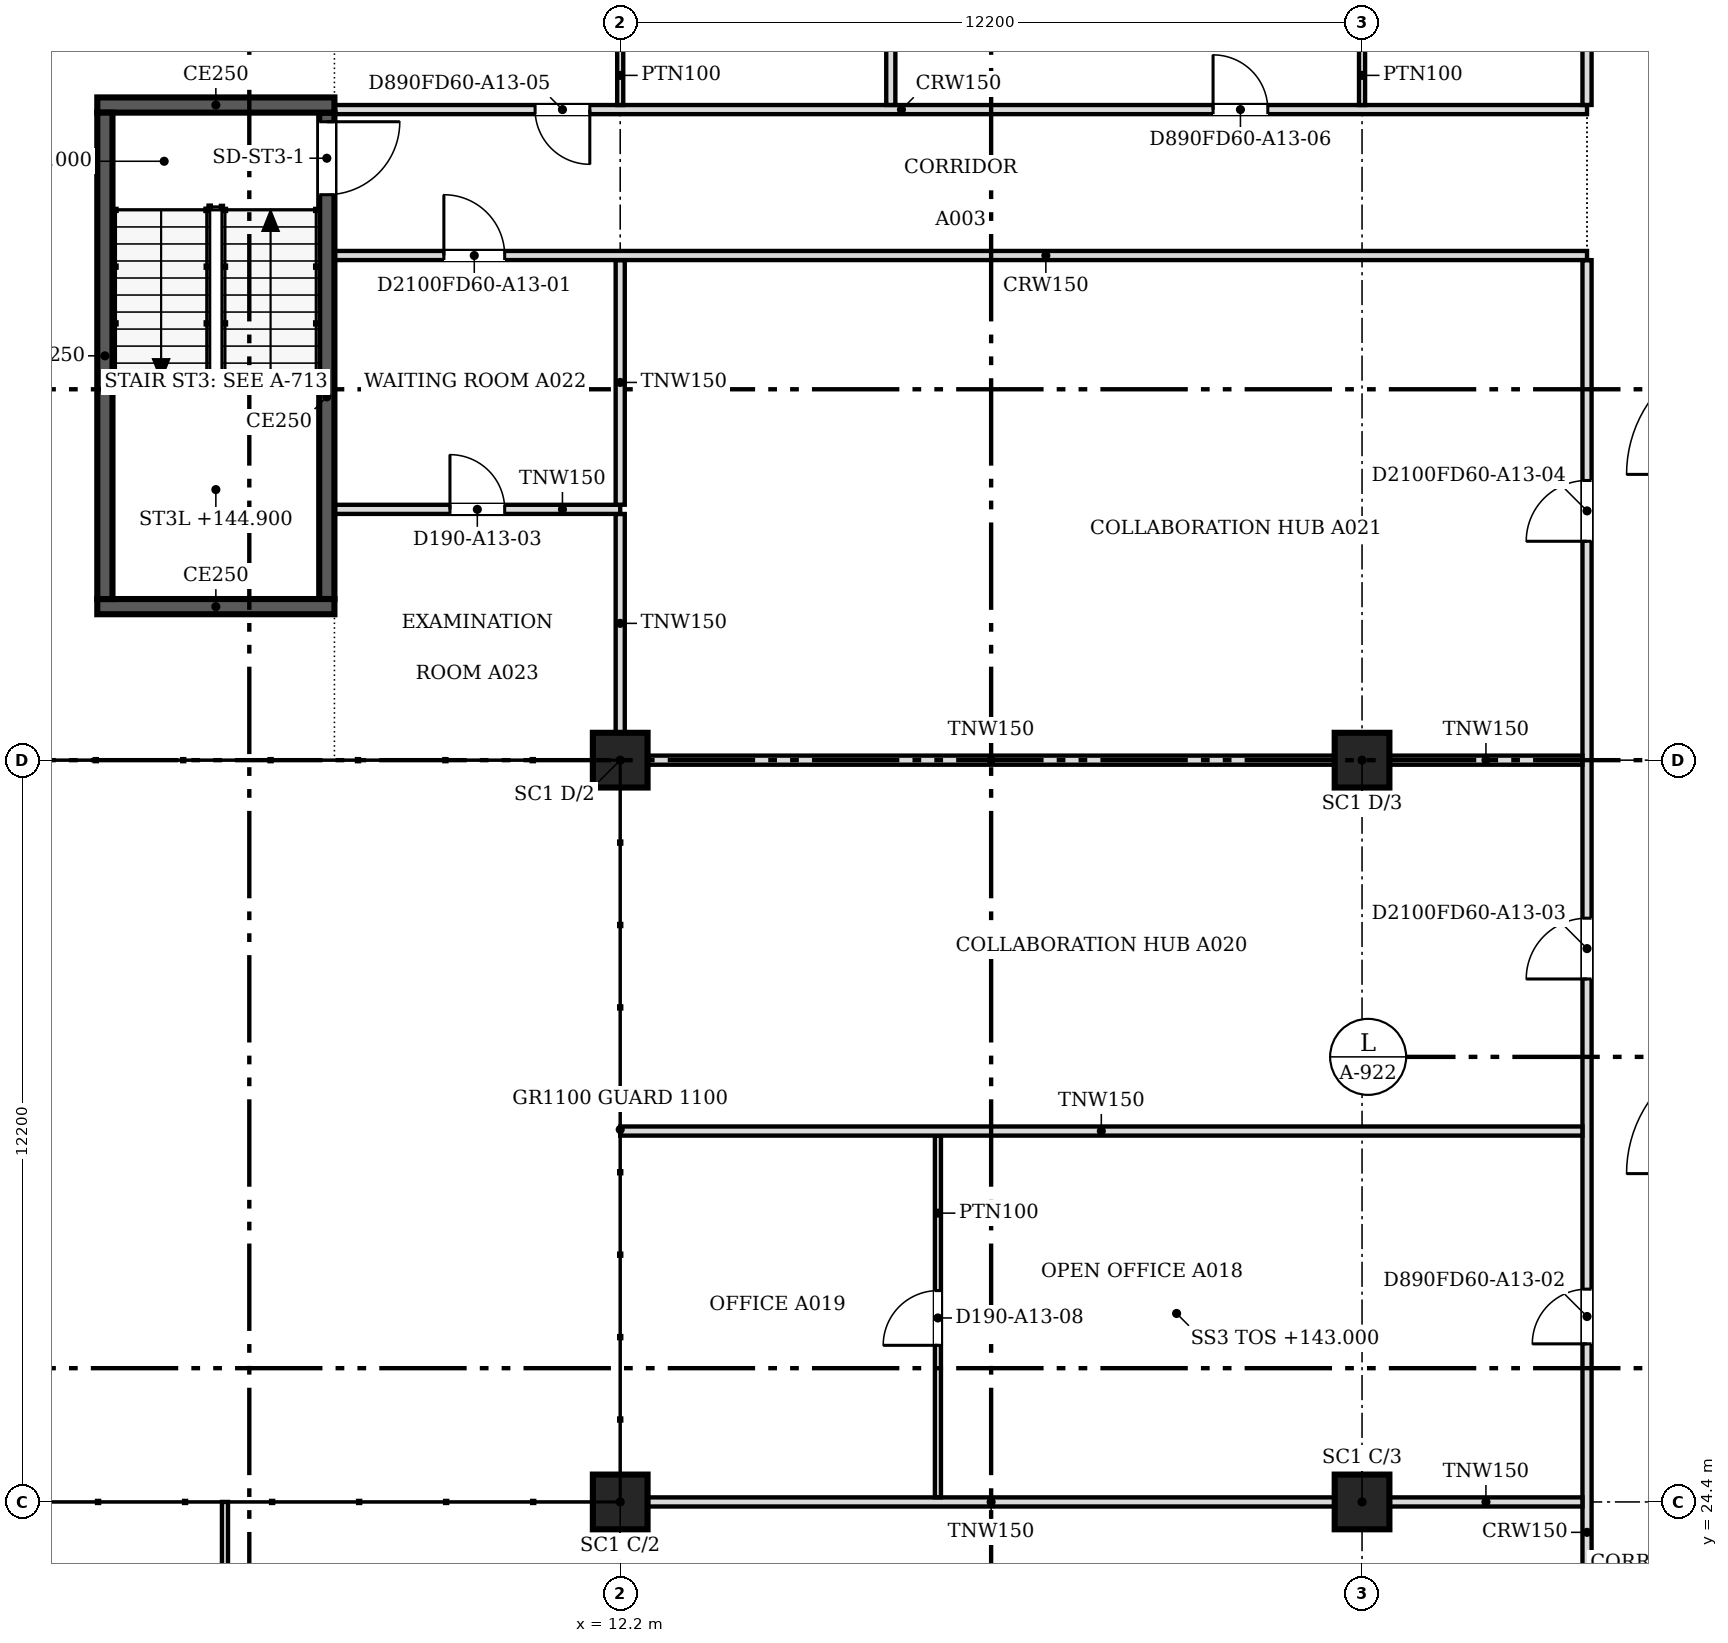
"""IFC4 building model, lengths in metres.
Left out: names, types, materials, properties, quantities, classifications, styles, units other than length and angle.
Written with IfcOpenShell. Run it as: python <this file> out.ifc"""

import sys

from ifc_helpers import new_model, si_unit, direction, frame, frame_2d, origin, origin_2d, place, context, subcontext, project, spatial, rectangle, extrude, source, transform, mapped, element, fill, save


model = new_model("IFC4")
c1 = context("Model", 3, precision=1e-05, world=origin(), true_north=direction((0.0, 1.0)))
c2 = subcontext(c1, "Body", "Model", "MODEL_VIEW")
j1 = project(units=[si_unit("LENGTHUNIT", "METRE"), si_unit("PLANEANGLEUNIT", "RADIAN")], contexts=[c1])
p1 = place(None, origin())
s1 = spatial("IfcSite", under=j1, at=p1, CompositionType="ELEMENT")
p2 = place(p1, origin())
s2 = spatial("IfcBuilding", under=s1, at=p2, CompositionType="ELEMENT")
p3 = place(p2, frame((0.0, 0.0, 143.0)))
s3 = spatial("IfcBuildingStorey", under=s2, at=p3, CompositionType="ELEMENT", Elevation=143.0)
for number, where, z_axis, x_axis in (
    (1, (12.2, 24.4, 0.0), (0.0, 0.0, 1.0), (1.0, 0.0, 0.0)),
    (2, (12.2, 36.6, 0.0), (0.0, 0.0, 1.0), (1.0, 0.0, 0.0)),
    (3, (24.4, 24.4, 0.0), (0.0, 0.0, 1.0), (1.0, 0.0, 0.0)),
    (4, (24.4, 36.6, 0.0), (0.0, 0.0, 1.0), (1.0, 0.0, 0.0)),
):
    element("IfcColumn", number, at=place(p3, frame(where, z_axis=z_axis, x_axis=x_axis)), inside=s3, PredefinedType="COLUMN", context=c2, shape_type="SweptSolid", body=[
        extrude(rectangle(XDim=0.9, YDim=0.9, at=origin_2d()), origin(), (0.0, 0.0, 1.0), 3.6),
    ])
p4 = place(p3, frame((7.5, 39.125, 0.0), z_axis=(0.0, 0.0, 1.0), x_axis=(-1.0, 0.0, 0.0)))
e5 = element("IfcWall", 5, at=p4, inside=s3, PredefinedType="SOLIDWALL", context=c2, shape_type="SweptSolid", body=[
    extrude(rectangle(XDim=3.9, YDim=0.25, at=frame_2d((1.95, 0.0))), origin(), (0.0, 0.0, 1.0), 3.8),
])
p5 = place(p3, frame((3.725, 39.25, 0.0), z_axis=(0.0, 0.0, 1.0), x_axis=(0.0, 1.0, 0.0)))
e6 = element("IfcWall", 6, at=p5, inside=s3, PredefinedType="SOLIDWALL", context=c2, shape_type="SweptSolid", body=[
    extrude(rectangle(XDim=8.0, YDim=0.25, at=frame_2d((4.0, 0.0))), origin(), (0.0, 0.0, 1.0), 3.8),
])
p6 = place(p3, frame((3.6, 47.375, 0.0), z_axis=(0.0, 0.0, 1.0), x_axis=(1.0, 0.0, 0.0)))
e7 = element("IfcWall", 7, at=p6, inside=s3, PredefinedType="SOLIDWALL", context=c2, shape_type="SweptSolid", body=[
    extrude(rectangle(XDim=3.9, YDim=0.25, at=frame_2d((1.95, 0.0))), origin(), (0.0, 0.0, 1.0), 3.8),
])
p7 = place(p3, frame((7.375, 47.25, 0.0), z_axis=(0.0, 0.0, 1.0), x_axis=(0.0, -1.0, 0.0)))
e8 = element("IfcWall", 8, at=p7, inside=s3, PredefinedType="SOLIDWALL", context=c2, shape_type="SweptSolid", body=[
    extrude(rectangle(XDim=8.0, YDim=0.25, at=frame_2d((4.0, 0.0))), origin(), (0.0, 0.0, 1.0), 3.8),
])
m1 = source(origin(), c2, "Body", "SweptSolid", [
    extrude(rectangle(XDim=1.2, YDim=2.1, at=frame_2d((0.6, 1.05))), frame((0.0, 0.135, 0.0), z_axis=(0.0, -1.0, 0.0), x_axis=(1.0, 0.0, 0.0)), (0.0, 0.0, 1.0), 0.27),
])
p8 = place(p7, frame((0.15, 0.0, 0.0)))
e9 = element("IfcOpeningElement", 9, at=p8, cuts=e8, PredefinedType="OPENING", context=c2, shape_type="MappedRepresentation", body=[
    mapped(m1, transform((0.0, 0.0, 0.0), scale=1.0)),
])
p9 = place(p3, frame((28.1, 18.8, 0.0), z_axis=(0.0, 0.0, 1.0), x_axis=(0.0, 1.0, 0.0)))
e10 = element("IfcWall", 10, at=p9, inside=s3, PredefinedType="PARTITIONING", context=c2, shape_type="SweptSolid", body=[
    extrude(rectangle(XDim=26.024, YDim=0.15, at=frame_2d((13.012, 0.0))), origin(), (0.0, 0.0, 1.0), 3.067),
])
m2 = source(origin(), c2, "Body", "SweptSolid", [
    extrude(rectangle(XDim=0.9, YDim=2.1, at=frame_2d((0.45, 1.05))), frame((0.0, 0.085, 0.0), z_axis=(0.0, -1.0, 0.0), x_axis=(1.0, 0.0, 0.0)), (0.0, 0.0, 1.0), 0.17),
])
p10 = place(p9, frame((1.1, 0.0, 0.0)))
e11 = element("IfcOpeningElement", 11, at=p10, cuts=e10, PredefinedType="OPENING", context=c2, shape_type="MappedRepresentation", body=[
    mapped(m2, transform((0.0, 0.0, 0.0), scale=1.0)),
])
m3 = source(origin(), c2, "Body", "SweptSolid", [
    extrude(rectangle(XDim=1.0, YDim=2.1, at=frame_2d((0.5, 1.05))), frame((0.0, 0.085, 0.0), z_axis=(0.0, -1.0, 0.0), x_axis=(1.0, 0.0, 0.0)), (0.0, 0.0, 1.0), 0.17),
])
p11 = place(p9, frame((14.201, 0.0, 0.0)))
e12 = element("IfcOpeningElement", 12, at=p11, cuts=e10, PredefinedType="OPENING", context=c2, shape_type="MappedRepresentation", body=[
    mapped(m3, transform((0.0, 0.0, 0.0), scale=1.0)),
])
p12 = place(p9, frame((8.2, 0.0, 0.0)))
e13 = element("IfcOpeningElement", 13, at=p12, cuts=e10, PredefinedType="OPENING", context=c2, shape_type="MappedRepresentation", body=[
    mapped(m2, transform((0.0, 0.0, 0.0), scale=1.0)),
])
p13 = place(p9, frame((21.4, 0.0, 0.0)))
e14 = element("IfcOpeningElement", 14, at=p13, cuts=e10, PredefinedType="OPENING", context=c2, shape_type="MappedRepresentation", body=[
    mapped(m3, transform((0.0, 0.0, 0.0), scale=1.0)),
])
p14 = place(p3, frame((5.7, 18.99, 0.0), z_axis=(0.0, 0.0, 1.0), x_axis=(0.0, 1.0, 0.0)))
e15 = element("IfcWall", 15, at=p14, inside=s3, PredefinedType="PARTITIONING", context=c2, shape_type="SweptSolid", body=[
    extrude(rectangle(XDim=5.41, YDim=0.1, at=frame_2d((2.705, 0.0))), origin(), (0.0, 0.0, 1.0), 3.067),
])
m4 = source(origin(), c2, "Body", "SweptSolid", [
    extrude(rectangle(XDim=0.9, YDim=2.1, at=frame_2d((0.45, 1.05))), frame((0.0, 0.06, 0.0), z_axis=(0.0, -1.0, 0.0), x_axis=(1.0, 0.0, 0.0)), (0.0, 0.0, 1.0), 0.12),
])
p15 = place(p14, frame((2.3, 0.0, 0.0)))
e16 = element("IfcOpeningElement", 16, at=p15, cuts=e15, PredefinedType="OPENING", context=c2, shape_type="MappedRepresentation", body=[
    mapped(m4, transform((0.0, 0.0, 0.0), scale=1.0)),
])
p16 = place(p3, frame((12.651, 24.4, 0.0), z_axis=(0.0, 0.0, 1.0), x_axis=(1.0, 0.0, 0.0)))
e17 = element("IfcWall", 17, at=p16, inside=s3, PredefinedType="PARTITIONING", context=c2, shape_type="SweptSolid", body=[
    extrude(rectangle(XDim=11.298, YDim=0.15, at=frame_2d((5.649, 0.0))), origin(), (0.0, 0.0, 1.0), 3.067),
])
p17 = place(p3, frame((24.851, 24.4, 0.0), z_axis=(0.0, 0.0, 1.0), x_axis=(1.0, 0.0, 0.0)))
e18 = element("IfcWall", 18, at=p17, inside=s3, PredefinedType="PARTITIONING", context=c2, shape_type="SweptSolid", body=[
    extrude(rectangle(XDim=3.173, YDim=0.15, at=frame_2d((1.586, 0.0))), origin(), (0.0, 0.0, 1.0), 3.067),
])
p18 = place(p3, frame((17.425, 24.476, 0.0), z_axis=(0.0, 0.0, 1.0), x_axis=(0.0, 1.0, 0.0)))
e19 = element("IfcWall", 19, at=p18, inside=s3, PredefinedType="PARTITIONING", context=c2, shape_type="SweptSolid", body=[
    extrude(rectangle(XDim=5.948, YDim=0.1, at=frame_2d((2.974, 0.0))), origin(), (0.0, 0.0, 1.0), 3.067),
])
p19 = place(p18, frame((2.5, 0.0, 0.0)))
e20 = element("IfcOpeningElement", 20, at=p19, cuts=e19, PredefinedType="OPENING", context=c2, shape_type="MappedRepresentation", body=[
    mapped(m4, transform((0.0, 0.0, 0.0), scale=1.0)),
])
p20 = place(p3, frame((12.2, 30.5, 0.0), z_axis=(0.0, 0.0, 1.0), x_axis=(1.0, 0.0, 0.0)))
e21 = element("IfcWall", 21, at=p20, inside=s3, PredefinedType="PARTITIONING", context=c2, shape_type="SweptSolid", body=[
    extrude(rectangle(XDim=15.824, YDim=0.15, at=frame_2d((7.912, 0.0))), origin(), (0.0, 0.0, 1.0), 3.067),
])
p21 = place(p3, frame((12.651, 36.6, 0.0), z_axis=(0.0, 0.0, 1.0), x_axis=(1.0, 0.0, 0.0)))
e22 = element("IfcWall", 22, at=p21, inside=s3, PredefinedType="PARTITIONING", context=c2, shape_type="SweptSolid", body=[
    extrude(rectangle(XDim=11.298, YDim=0.15, at=frame_2d((5.649, 0.0))), origin(), (0.0, 0.0, 1.0), 3.067),
])
p22 = place(p3, frame((24.851, 36.6, 0.0), z_axis=(0.0, 0.0, 1.0), x_axis=(1.0, 0.0, 0.0)))
e23 = element("IfcWall", 23, at=p22, inside=s3, PredefinedType="PARTITIONING", context=c2, shape_type="SweptSolid", body=[
    extrude(rectangle(XDim=3.173, YDim=0.15, at=frame_2d((1.586, 0.0))), origin(), (0.0, 0.0, 1.0), 3.067),
])
p23 = place(p3, frame((12.2, 37.051, 0.0), z_axis=(0.0, 0.0, 1.0), x_axis=(0.0, 1.0, 0.0)))
e24 = element("IfcWall", 24, at=p23, inside=s3, PredefinedType="PARTITIONING", context=c2, shape_type="SweptSolid", body=[
    extrude(rectangle(XDim=3.598, YDim=0.15, at=frame_2d((1.799, 0.0))), origin(), (0.0, 0.0, 1.0), 3.067),
])
p24 = place(p3, frame((12.2, 40.725, 0.0), z_axis=(0.0, 0.0, 1.0), x_axis=(-1.0, 0.0, 0.0)))
e25 = element("IfcWall", 25, at=p24, inside=s3, PredefinedType="PARTITIONING", context=c2, shape_type="SweptSolid", body=[
    extrude(rectangle(XDim=4.7, YDim=0.15, at=frame_2d((2.35, 0.0))), origin(), (0.0, 0.0, 1.0), 3.067),
])
p25 = place(p24, frame((1.9, 0.0, 0.0)))
e26 = element("IfcOpeningElement", 26, at=p25, cuts=e25, PredefinedType="OPENING", context=c2, shape_type="MappedRepresentation", body=[
    mapped(m2, transform((0.0, 0.0, 0.0), scale=1.0)),
])
p26 = place(p3, frame((12.2, 40.801, 0.0), z_axis=(0.0, 0.0, 1.0), x_axis=(0.0, 1.0, 0.0)))
e27 = element("IfcWall", 27, at=p26, inside=s3, PredefinedType="PARTITIONING", context=c2, shape_type="SweptSolid", body=[
    extrude(rectangle(XDim=4.023, YDim=0.15, at=frame_2d((2.011, 0.0))), origin(), (0.0, 0.0, 1.0), 3.067),
])
p27 = place(p3, frame((28.1, 44.9, 0.0), z_axis=(0.0, 0.0, 1.0), x_axis=(-1.0, 0.0, 0.0)))
e28 = element("IfcWall", 28, at=p27, inside=s3, PredefinedType="PARTITIONING", context=c2, shape_type="SweptSolid", body=[
    extrude(rectangle(XDim=20.6, YDim=0.15, at=frame_2d((10.3, 0.0))), origin(), (0.0, 0.0, 1.0), 3.067),
])
p28 = place(p27, frame((17.8, 0.0, 0.0)))
e29 = element("IfcOpeningElement", 29, at=p28, cuts=e28, PredefinedType="OPENING", context=c2, shape_type="MappedRepresentation", body=[
    mapped(m3, transform((0.0, 0.0, 0.0), scale=1.0)),
])
p29 = place(p3, frame((7.5, 47.3, 0.0), z_axis=(0.0, 0.0, 1.0), x_axis=(1.0, 0.0, 0.0)))
e30 = element("IfcWall", 30, at=p29, inside=s3, PredefinedType="PARTITIONING", context=c2, shape_type="SweptSolid", body=[
    extrude(rectangle(XDim=20.6, YDim=0.15, at=frame_2d((10.3, 0.0))), origin(), (0.0, 0.0, 1.0), 3.067),
])
p30 = place(p29, frame((3.3, 0.0, 0.0)))
e31 = element("IfcOpeningElement", 31, at=p30, cuts=e30, PredefinedType="OPENING", context=c2, shape_type="MappedRepresentation", body=[
    mapped(m2, transform((0.0, 0.0, 0.0), scale=1.0)),
])
p31 = place(p29, frame((14.45, 0.0, 0.0)))
e32 = element("IfcOpeningElement", 32, at=p31, cuts=e30, PredefinedType="OPENING", context=c2, shape_type="MappedRepresentation", body=[
    mapped(m2, transform((0.0, 0.0, 0.0), scale=1.0)),
])
p32 = place(p3, frame((16.65, 47.376, 0.0), z_axis=(0.0, 0.0, 1.0), x_axis=(0.0, 1.0, 0.0)))
e33 = element("IfcWall", 33, at=p32, inside=s3, PredefinedType="PARTITIONING", context=c2, shape_type="SweptSolid", body=[
    extrude(rectangle(XDim=3.274, YDim=0.15, at=frame_2d((1.637, 0.0))), origin(), (0.0, 0.0, 1.0), 3.067),
])
p33 = place(p3, frame((28.1, 47.376, 0.0), z_axis=(0.0, 0.0, 1.0), x_axis=(0.0, 1.0, 0.0)))
e34 = element("IfcWall", 34, at=p33, inside=s3, PredefinedType="PARTITIONING", context=c2, shape_type="SweptSolid", body=[
    extrude(rectangle(XDim=3.748, YDim=0.15, at=frame_2d((1.874, 0.0))), origin(), (0.0, 0.0, 1.0), 3.067),
])
for number, where, z_axis, x_axis in (
    (35, (12.2, 48.35, 0.0), (0.0, 0.0, 1.0), (0.0, -1.0, 0.0)),
    (36, (24.4, 48.35, 0.0), (0.0, 0.0, 1.0), (0.0, -1.0, 0.0)),
):
    element("IfcWall", number, at=place(p3, frame(where, z_axis=z_axis, x_axis=x_axis)), inside=s3, PredefinedType="PARTITIONING", context=c2, shape_type="SweptSolid", body=[
        extrude(rectangle(XDim=0.975, YDim=0.1, at=frame_2d((0.488, 0.0))), origin(), (0.0, 0.0, 1.0), 3.067),
    ])
m5 = source(origin(), c2, "Body", "SweptSolid", [
    extrude(rectangle(XDim=1.2, YDim=2.1, at=frame_2d((0.6, 1.05))), frame((0.0, 0.025, 0.0), z_axis=(0.0, -1.0, 0.0), x_axis=(1.0, 0.0, 0.0)), (0.0, 0.0, 1.0), 0.05),
])
p34 = place(p8, origin())
e37 = element("IfcDoor", 37, at=p34, inside=s3, OperationType="SINGLE_SWING_LEFT", PredefinedType="DOOR", context=c2, shape_type="MappedRepresentation", body=[
    mapped(m5, transform((0.0, 0.0, 0.0), scale=1.0)),
])
fill(e9, e37)
m6 = source(origin(), c2, "Body", "SweptSolid", [
    extrude(rectangle(XDim=1.0, YDim=2.1, at=frame_2d((0.5, 1.05))), frame((0.0, 0.025, 0.0), z_axis=(0.0, -1.0, 0.0), x_axis=(1.0, 0.0, 0.0)), (0.0, 0.0, 1.0), 0.05),
])
p35 = place(p28, origin())
e38 = element("IfcDoor", 38, at=p35, inside=s3, OperationType="SINGLE_SWING_RIGHT", PredefinedType="DOOR", context=c2, shape_type="MappedRepresentation", body=[
    mapped(m6, transform((0.0, 0.0, 0.0), scale=1.0)),
])
fill(e29, e38)
m7 = source(origin(), c2, "Body", "SweptSolid", [
    extrude(rectangle(XDim=0.9, YDim=2.1, at=frame_2d((0.45, 1.05))), frame((0.0, 0.025, 0.0), z_axis=(0.0, -1.0, 0.0), x_axis=(1.0, 0.0, 0.0)), (0.0, 0.0, 1.0), 0.05),
])
p36 = place(p25, origin())
e39 = element("IfcDoor", 39, at=p36, inside=s3, OperationType="SINGLE_SWING_RIGHT", PredefinedType="DOOR", context=c2, shape_type="MappedRepresentation", body=[
    mapped(m7, transform((0.0, 0.0, 0.0), scale=1.0)),
])
fill(e26, e39)
p37 = place(p19, origin())
e40 = element("IfcDoor", 40, at=p37, inside=s3, OperationType="SINGLE_SWING_LEFT", PredefinedType="DOOR", context=c2, shape_type="MappedRepresentation", body=[
    mapped(m7, transform((0.0, 0.0, 0.0), scale=1.0)),
])
fill(e20, e40)
p38 = place(p11, origin())
e41 = element("IfcDoor", 41, at=p38, inside=s3, OperationType="SINGLE_SWING_LEFT", PredefinedType="DOOR", context=c2, shape_type="MappedRepresentation", body=[
    mapped(m6, transform((0.0, 0.0, 0.0), scale=1.0)),
])
fill(e12, e41)
p39 = place(p12, origin())
e42 = element("IfcDoor", 42, at=p39, inside=s3, OperationType="SINGLE_SWING_LEFT", PredefinedType="DOOR", context=c2, shape_type="MappedRepresentation", body=[
    mapped(m7, transform((0.0, 0.0, 0.0), scale=1.0)),
])
fill(e13, e42)
p40 = place(p13, origin())
e43 = element("IfcDoor", 43, at=p40, inside=s3, OperationType="SINGLE_SWING_LEFT", PredefinedType="DOOR", context=c2, shape_type="MappedRepresentation", body=[
    mapped(m6, transform((0.0, 0.0, 0.0), scale=1.0)),
])
fill(e14, e43)
p41 = place(p30, origin())
e44 = element("IfcDoor", 44, at=p41, inside=s3, OperationType="SINGLE_SWING_RIGHT", PredefinedType="DOOR", context=c2, shape_type="MappedRepresentation", body=[
    mapped(m7, transform((0.0, 0.0, 0.0), scale=1.0)),
])
fill(e31, e44)
p42 = place(p31, origin())
e45 = element("IfcDoor", 45, at=p42, inside=s3, OperationType="SINGLE_SWING_LEFT", PredefinedType="DOOR", context=c2, shape_type="MappedRepresentation", body=[
    mapped(m7, transform((0.0, 0.0, 0.0), scale=1.0)),
])
fill(e32, e45)
save(model, sys.argv[1])
